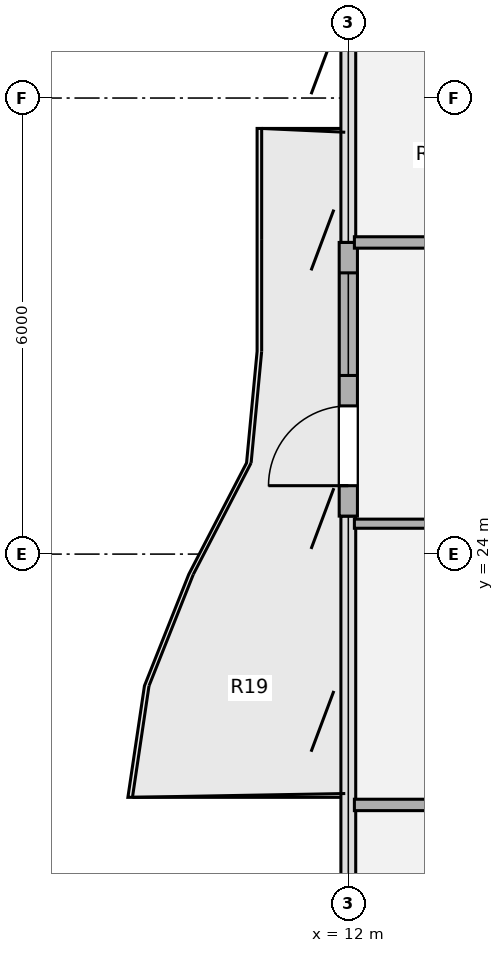
"""IFC4 building model, lengths in metres.
Left out: names, types, materials, properties, quantities, classifications, styles, units other than length and angle.
Written with IfcOpenShell. Run it as: python <this file> out.ifc"""

import sys

from ifc_helpers import new_model, si_unit, direction, frame, frame_2d, origin, origin_2d, place, context, subcontext, project, spatial, rectangle, extrude, source, transform, mapped, element, fill, save


model = new_model("IFC4")
c1 = context("Model", 3, precision=1e-05, world=origin(), true_north=direction((0.0, 1.0)))
c2 = subcontext(c1, "Body", "Model", "MODEL_VIEW")
j1 = project(units=[si_unit("LENGTHUNIT", "METRE"), si_unit("PLANEANGLEUNIT", "RADIAN")], contexts=[c1])
p1 = place(None, origin())
s1 = spatial("IfcSite", under=j1, at=p1, CompositionType="ELEMENT")
p2 = place(p1, origin())
s2 = spatial("IfcBuilding", under=s1, at=p2, CompositionType="ELEMENT")
p3 = place(p2, frame((0.0, 0.0, 34.56)))
s3 = spatial("IfcBuildingStorey", under=s2, at=p3, CompositionType="ELEMENT", Elevation=34.56)
p4 = place(p3, frame((12.0, 24.5, 0.0), z_axis=(0.0, 0.0, 1.0), x_axis=(0.0, 1.0, 0.0)))
e1 = element("IfcWall", 1, at=p4, inside=s3, PredefinedType="SOLIDWALL", context=c2, shape_type="SweptSolid", body=[
    extrude(rectangle(XDim=3.6, YDim=0.24, at=frame_2d((1.8, 0.0))), origin(), (0.0, 0.0, 1.0), 3.53),
])
p5 = place(p4, frame((0.4, 0.0, 0.0)))
e2 = element("IfcOpeningElement", 2, at=p5, cuts=e1, PredefinedType="OPENING", context=c2, shape_type="SweptSolid", body=[
    extrude(rectangle(XDim=1.05, YDim=2.15, at=origin_2d()), frame((0.525, 0.13, 1.075), z_axis=(0.0, -1.0, 0.0), x_axis=(1.0, 0.0, 0.0)), (0.0, 0.0, 1.0), 0.26),
])
p6 = place(p4, frame((1.85, 0.0, 0.85)))
e3 = element("IfcOpeningElement", 3, at=p6, cuts=e1, PredefinedType="OPENING", context=c2, shape_type="SweptSolid", body=[
    extrude(rectangle(XDim=1.35, YDim=1.35, at=origin_2d()), frame((0.675, 0.13, 0.675), z_axis=(0.0, -1.0, 0.0), x_axis=(1.0, 0.0, 0.0)), (0.0, 0.0, 1.0), 0.26),
])
p7 = place(p3, frame((12.08, 20.7, 0.0), z_axis=(0.0, 0.0, 1.0), x_axis=(1.0, 0.0, 0.0)))
e4 = element("IfcWall", 4, at=p7, inside=s3, PredefinedType="PARTITIONING", context=c2, shape_type="SweptSolid", body=[
    extrude(rectangle(XDim=10.02, YDim=0.15, at=frame_2d((5.01, 0.0))), origin(), (0.0, 0.0, 1.0), 2.982),
])
p8 = place(p3, frame((12.08, 24.4, 0.0), z_axis=(0.0, 0.0, 1.0), x_axis=(1.0, 0.0, 0.0)))
e5 = element("IfcWall", 5, at=p8, inside=s3, PredefinedType="PARTITIONING", context=c2, shape_type="SweptSolid", body=[
    extrude(rectangle(XDim=3.984, YDim=0.12, at=frame_2d((1.992, 0.0))), origin(), (0.0, 0.0, 1.0), 2.982),
])
p9 = place(p3, frame((12.08, 28.1, 0.0), z_axis=(0.0, 0.0, 1.0), x_axis=(1.0, 0.0, 0.0)))
e6 = element("IfcWall", 6, at=p9, inside=s3, PredefinedType="PARTITIONING", context=c2, shape_type="SweptSolid", body=[
    extrude(rectangle(XDim=10.02, YDim=0.15, at=frame_2d((5.01, 0.0))), origin(), (0.0, 0.0, 1.0), 2.982),
])
m1 = source(origin(), c2, "Body", "SweptSolid", [
    extrude(rectangle(XDim=1.05, YDim=2.15, at=origin_2d()), frame((0.525, 0.025, 1.075), z_axis=(0.0, -1.0, 0.0), x_axis=(1.0, 0.0, 0.0)), (0.0, 0.0, 1.0), 0.05),
])
p10 = place(p5, origin())
e7 = element("IfcDoor", 7, at=p10, inside=s3, OperationType="SINGLE_SWING_LEFT", PredefinedType="DOOR", context=c2, shape_type="MappedRepresentation", body=[
    mapped(m1, transform((0.0, 0.0, 0.0), x_axis=(1.0, 0.0, 0.0), y_axis=(0.0, 1.0, 0.0), z_axis=(0.0, 0.0, 1.0), scale=1.0)),
])
fill(e2, e7)
m2 = source(origin(), c2, "Body", "SweptSolid", [
    extrude(rectangle(XDim=1.35, YDim=1.35, at=origin_2d()), frame((0.675, 0.03, 0.675), z_axis=(0.0, -1.0, 0.0), x_axis=(1.0, 0.0, 0.0)), (0.0, 0.0, 1.0), 0.06),
])
p11 = place(p6, origin())
e8 = element("IfcWindow", 8, at=p11, inside=s3, PartitioningType="SINGLE_PANEL", PredefinedType="WINDOW", context=c2, shape_type="MappedRepresentation", body=[
    mapped(m2, transform((0.0, 0.0, 0.0), x_axis=(1.0, 0.0, 0.0), y_axis=(0.0, 1.0, 0.0), z_axis=(0.0, 0.0, 1.0), scale=1.0)),
])
fill(e3, e8)
save(model, sys.argv[1])
